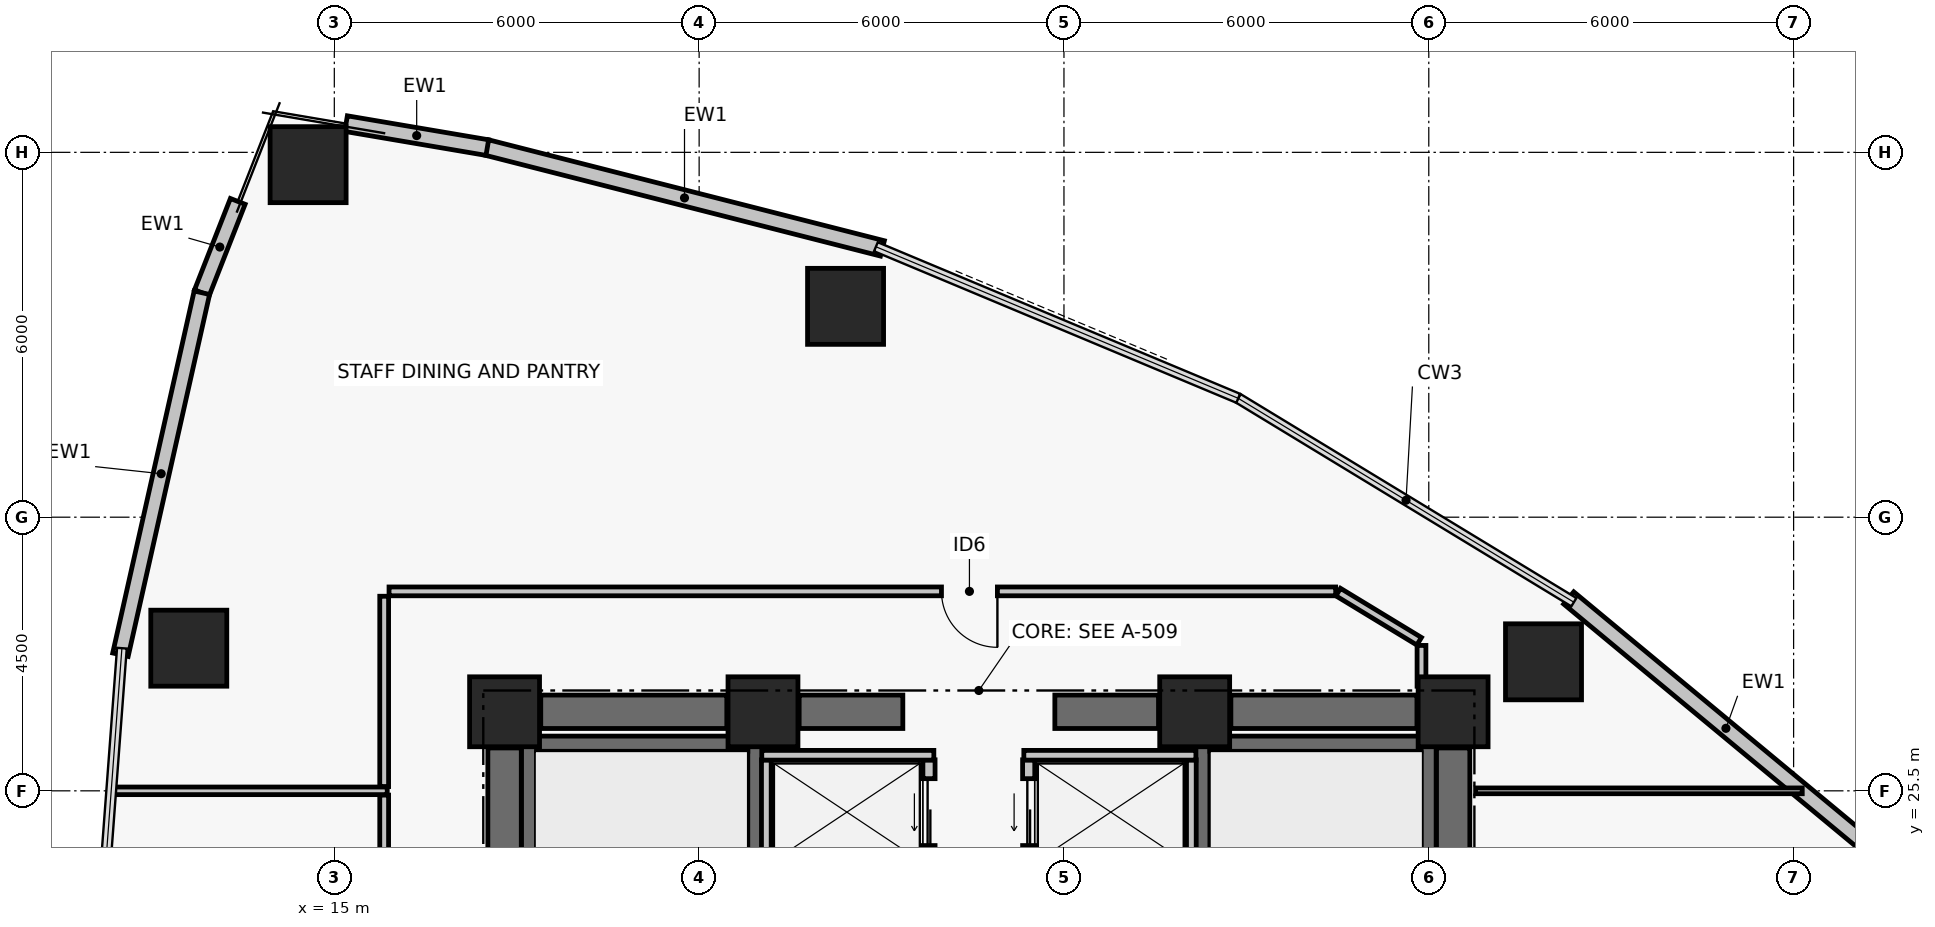
"""IFC4 building model, lengths in metres.
Left out: names, types, materials, properties, quantities, classifications, styles, units other than length and angle.
Written with IfcOpenShell. Run it as: python <this file> out.ifc"""

import sys

from ifc_helpers import new_model, si_unit, direction, frame, frame_2d, origin, origin_2d, place, context, subcontext, project, spatial, rectangle, hollow_rectangle, extrude, element, fill, save


model = new_model("IFC4")
c1 = context("Model", 3, precision=1e-05, world=origin(), true_north=direction((0.0, 1.0)))
c2 = subcontext(c1, "Body", "Model", "MODEL_VIEW")
j1 = project(units=[si_unit("LENGTHUNIT", "METRE"), si_unit("PLANEANGLEUNIT", "RADIAN")], contexts=[c1])
p1 = place(None, origin())
s1 = spatial("IfcSite", under=j1, at=p1, CompositionType="ELEMENT")
p2 = place(p1, origin())
s2 = spatial("IfcBuilding", under=s1, at=p2, CompositionType="ELEMENT")
p3 = place(p2, frame((0.0, 0.0, 89.1)))
s3 = spatial("IfcBuildingStorey", under=s2, at=p3, CompositionType="ELEMENT", Elevation=89.1)
for number, where, z_axis, x_axis in (
    (1, (17.8, 26.8, 0.0), (0.0, 0.0, 1.0), (1.0, 0.0, 0.0)),
    (2, (22.05, 26.8, 0.0), (0.0, 0.0, 1.0), (1.0, 0.0, 0.0)),
    (3, (29.15, 26.8, 0.0), (0.0, 0.0, 1.0), (1.0, 0.0, 0.0)),
    (4, (33.4, 26.8, 0.0), (0.0, 0.0, 1.0), (1.0, 0.0, 0.0)),
):
    element("IfcColumn", number, at=place(p3, frame(where, z_axis=z_axis, x_axis=x_axis)), inside=s3, PredefinedType="COLUMN", context=c2, shape_type="SweptSolid", body=[
        extrude(rectangle(XDim=1.15, YDim=1.15, at=origin_2d()), origin(), (0.0, 0.0, 1.0), 3.72),
    ])
p4 = place(p3, frame((18.395, 26.8, 0.0), z_axis=(0.0, 0.0, 1.0), x_axis=(1.0, 0.0, 0.0)))
e5 = element("IfcWall", 5, at=p4, inside=s3, PredefinedType="SHEAR", context=c2, shape_type="SweptSolid", body=[
    extrude(rectangle(XDim=3.06, YDim=0.55, at=frame_2d((1.53, 0.0))), origin(), (0.0, 0.0, 1.0), 3.47),
])
p5 = place(p3, frame((22.645, 26.8, 0.0), z_axis=(0.0, 0.0, 1.0), x_axis=(1.0, 0.0, 0.0)))
e6 = element("IfcWall", 6, at=p5, inside=s3, PredefinedType="SHEAR", context=c2, shape_type="SweptSolid", body=[
    extrude(rectangle(XDim=1.705, YDim=0.55, at=frame_2d((0.853, 0.0))), origin(), (0.0, 0.0, 1.0), 3.47),
])
p6 = place(p3, frame((26.85, 26.8, 0.0), z_axis=(0.0, 0.0, 1.0), x_axis=(1.0, 0.0, 0.0)))
e7 = element("IfcWall", 7, at=p6, inside=s3, PredefinedType="SHEAR", context=c2, shape_type="SweptSolid", body=[
    extrude(rectangle(XDim=1.705, YDim=0.55, at=frame_2d((0.853, 0.0))), origin(), (0.0, 0.0, 1.0), 3.47),
])
p7 = place(p3, frame((29.745, 26.8, 0.0), z_axis=(0.0, 0.0, 1.0), x_axis=(1.0, 0.0, 0.0)))
e8 = element("IfcWall", 8, at=p7, inside=s3, PredefinedType="SHEAR", context=c2, shape_type="SweptSolid", body=[
    extrude(rectangle(XDim=3.06, YDim=0.55, at=frame_2d((1.53, 0.0))), origin(), (0.0, 0.0, 1.0), 3.47),
])
for number, where, z_axis, x_axis in (
    (9, (17.8, 17.795, 0.0), (0.0, 0.0, 1.0), (0.0, 1.0, 0.0)),
    (10, (33.4, 17.795, 0.0), (0.0, 0.0, 1.0), (0.0, 1.0, 0.0)),
):
    element("IfcWall", number, at=place(p3, frame(where, z_axis=z_axis, x_axis=x_axis)), inside=s3, PredefinedType="SHEAR", context=c2, shape_type="SweptSolid", body=[
        extrude(rectangle(XDim=8.41, YDim=0.55, at=frame_2d((4.205, 0.0))), origin(), (0.0, 0.0, 1.0), 3.47),
    ])
p8 = place(p3, frame((18.204, 17.6, 0.0), z_axis=(0.0, 0.0, 1.0), x_axis=(0.0, 1.0, 0.0)))
e11 = element("IfcWall", 11, at=p8, inside=s3, PredefinedType="SHEAR", context=c2, shape_type="SweptSolid", body=[
    extrude(rectangle(XDim=8.8, YDim=0.25, at=frame_2d((4.4, 0.0))), origin(), (0.0, 0.0, 1.0), 3.47),
])
p9 = place(p3, frame((21.925, 17.6, 0.0), z_axis=(0.0, 0.0, 1.0), x_axis=(0.0, 1.0, 0.0)))
e12 = element("IfcWall", 12, at=p9, inside=s3, PredefinedType="SHEAR", context=c2, shape_type="SweptSolid", body=[
    extrude(rectangle(XDim=8.8, YDim=0.25, at=frame_2d((4.4, 0.0))), origin(), (0.0, 0.0, 1.0), 3.47),
])
p10 = place(p9, frame((0.35, 0.0, 0.0)))
e13 = element("IfcOpeningElement", 13, at=p10, cuts=e12, PredefinedType="OPENING", context=c2, shape_type="SweptSolid", body=[
    extrude(rectangle(XDim=1.05, YDim=2.08, at=frame_2d((0.525, 1.04))), frame((0.0, 0.135, 0.0), z_axis=(0.0, -1.0, 0.0), x_axis=(1.0, 0.0, 0.0)), (0.0, 0.0, 1.0), 0.27),
])
p11 = place(p3, frame((18.329, 26.275, 0.0), z_axis=(0.0, 0.0, 1.0), x_axis=(1.0, 0.0, 0.0)))
e14 = element("IfcWall", 14, at=p11, inside=s3, PredefinedType="SHEAR", context=c2, shape_type="SweptSolid", body=[
    extrude(rectangle(XDim=3.471, YDim=0.25, at=frame_2d((1.735, 0.0))), origin(), (0.0, 0.0, 1.0), 3.47),
])
p12 = place(p3, frame((29.275, 17.6, 0.0), z_axis=(0.0, 0.0, 1.0), x_axis=(0.0, 1.0, 0.0)))
e15 = element("IfcWall", 15, at=p12, inside=s3, PredefinedType="SHEAR", context=c2, shape_type="SweptSolid", body=[
    extrude(rectangle(XDim=8.8, YDim=0.25, at=frame_2d((4.4, 0.0))), origin(), (0.0, 0.0, 1.0), 3.47),
])
p13 = place(p12, frame((0.35, 0.0, 0.0)))
e16 = element("IfcOpeningElement", 16, at=p13, cuts=e15, PredefinedType="OPENING", context=c2, shape_type="SweptSolid", body=[
    extrude(rectangle(XDim=1.05, YDim=2.08, at=frame_2d((0.525, 1.04))), frame((0.0, 0.135, 0.0), z_axis=(0.0, -1.0, 0.0), x_axis=(1.0, 0.0, 0.0)), (0.0, 0.0, 1.0), 0.27),
])
p14 = place(p3, frame((32.996, 17.6, 0.0), z_axis=(0.0, 0.0, 1.0), x_axis=(0.0, 1.0, 0.0)))
e17 = element("IfcWall", 17, at=p14, inside=s3, PredefinedType="SHEAR", context=c2, shape_type="SweptSolid", body=[
    extrude(rectangle(XDim=8.8, YDim=0.25, at=frame_2d((4.4, 0.0))), origin(), (0.0, 0.0, 1.0), 3.47),
])
p15 = place(p3, frame((29.4, 26.275, 0.0), z_axis=(0.0, 0.0, 1.0), x_axis=(1.0, 0.0, 0.0)))
e18 = element("IfcWall", 18, at=p15, inside=s3, PredefinedType="SHEAR", context=c2, shape_type="SweptSolid", body=[
    extrude(rectangle(XDim=3.471, YDim=0.25, at=frame_2d((1.736, 0.0))), origin(), (0.0, 0.0, 1.0), 3.47),
])
for number, where, z_axis, x_axis in (
    (19, (34.887, 27.622, 0.0), (0.0, 0.0, 1.0), (1.0, 0.0, 0.0)),
    (20, (23.408, 33.467, 0.0), (0.0, 0.0, 1.0), (1.0, 0.0, 0.0)),
    (21, (14.569, 35.797, 0.0), (0.0, 0.0, 1.0), (1.0, 0.0, 0.0)),
    (22, (12.607, 27.846, 0.0), (0.0, 0.0, 1.0), (1.0, 0.0, 0.0)),
):
    element("IfcColumn", number, at=place(p3, frame(where, z_axis=z_axis, x_axis=x_axis)), inside=s3, PredefinedType="COLUMN", context=c2, shape_type="SweptSolid", body=[
        extrude(hollow_rectangle(XDim=1.25, YDim=1.25, WallThickness=0.05, at=origin_2d()), origin(), (0.0, 0.0, 1.0), 3.72),
    ])
p16 = place(p3, frame((35.301, 28.672, 0.0), z_axis=(0.0, 0.0, 1.0), x_axis=(0.76975316947, -0.638341646841, 0.0)))
e23 = element("IfcWall", 23, at=p16, inside=s3, PredefinedType="PARTITIONING", context=c2, shape_type="SweptSolid", body=[
    extrude(rectangle(XDim=6.718, YDim=0.26, at=frame_2d((3.359, 0.0))), origin(), (0.0, 0.0, 1.0), 3.47),
])
p17 = place(p3, frame((17.505, 36.081, 0.0), z_axis=(0.0, 0.0, 1.0), x_axis=(0.968981437296, -0.247133514876, 0.0)))
e24 = element("IfcWall", 24, at=p17, inside=s3, PredefinedType="PARTITIONING", context=c2, shape_type="SweptSolid", body=[
    extrude(rectangle(XDim=6.718, YDim=0.26, at=frame_2d((3.359, 0.0))), origin(), (0.0, 0.0, 1.0), 3.47),
])
p18 = place(p3, frame((15.193, 36.472, 0.0), z_axis=(0.0, 0.0, 1.0), x_axis=(0.985905269947, -0.167304508875, 0.0)))
e25 = element("IfcWall", 25, at=p18, inside=s3, PredefinedType="PARTITIONING", context=c2, shape_type="SweptSolid", body=[
    extrude(rectangle(XDim=2.357, YDim=0.26, at=frame_2d((1.178, 0.0))), origin(), (0.0, 0.0, 1.0), 3.47),
])
p19 = place(p3, frame((12.822, 33.691, 0.0), z_axis=(0.0, 0.0, 1.0), x_axis=(0.365488551504, 0.930815835018, 0.0)))
e26 = element("IfcWall", 26, at=p19, inside=s3, PredefinedType="PARTITIONING", context=c2, shape_type="SweptSolid", body=[
    extrude(rectangle(XDim=1.614, YDim=0.26, at=frame_2d((0.807, 0.0))), origin(), (0.0, 0.0, 1.0), 3.47),
])
p20 = place(p3, frame((11.482, 27.738, 0.0), z_axis=(0.0, 0.0, 1.0), x_axis=(0.219535044336, 0.975604614743, 0.0)))
e27 = element("IfcWall", 27, at=p20, inside=s3, PredefinedType="PARTITIONING", context=c2, shape_type="SweptSolid", body=[
    extrude(rectangle(XDim=6.102, YDim=0.26, at=frame_2d((3.051, 0.0))), origin(), (0.0, 0.0, 1.0), 3.47),
])
p21 = place(p3, frame((24.78, 24.29, 0.0), z_axis=(0.0, 0.0, 1.0), x_axis=(0.0, 1.0, 0.0)))
e28 = element("IfcWall", 28, at=p21, inside=s3, PredefinedType="PARTITIONING", context=c2, shape_type="SweptSolid", body=[
    extrude(rectangle(XDim=1.72, YDim=0.2, at=frame_2d((0.86, 0.0))), origin(), (0.0, 0.0, 1.0), 3.47),
])
p22 = place(p21, frame((0.31, 0.0, 0.0)))
e29 = element("IfcOpeningElement", 29, at=p22, cuts=e28, PredefinedType="OPENING", context=c2, shape_type="SweptSolid", body=[
    extrude(rectangle(XDim=1.1, YDim=2.08, at=frame_2d((0.55, 1.04))), frame((0.0, 0.11, 0.0), z_axis=(0.0, -1.0, 0.0), x_axis=(1.0, 0.0, 0.0)), (0.0, 0.0, 1.0), 0.22),
])
p23 = place(p3, frame((26.42, 24.29, 0.0), z_axis=(0.0, 0.0, 1.0), x_axis=(0.0, 1.0, 0.0)))
e30 = element("IfcWall", 30, at=p23, inside=s3, PredefinedType="PARTITIONING", context=c2, shape_type="SweptSolid", body=[
    extrude(rectangle(XDim=1.72, YDim=0.2, at=frame_2d((0.86, 0.0))), origin(), (0.0, 0.0, 1.0), 3.47),
])
p24 = place(p23, frame((0.31, 0.0, 0.0)))
e31 = element("IfcOpeningElement", 31, at=p24, cuts=e30, PredefinedType="OPENING", context=c2, shape_type="SweptSolid", body=[
    extrude(rectangle(XDim=1.1, YDim=2.08, at=frame_2d((0.55, 1.04))), frame((0.0, 0.11, 0.0), z_axis=(0.0, -1.0, 0.0), x_axis=(1.0, 0.0, 0.0)), (0.0, 0.0, 1.0), 0.22),
])
p25 = place(p3, frame((22.105, 20.56, 0.0), z_axis=(0.0, 0.0, 1.0), x_axis=(0.0, 1.0, 0.0)))
e32 = element("IfcWall", 32, at=p25, inside=s3, PredefinedType="PARTITIONING", context=c2, shape_type="SweptSolid", body=[
    extrude(rectangle(XDim=5.45, YDim=0.16, at=frame_2d((2.725, 0.0))), origin(), (0.0, 0.0, 1.0), 3.47),
])
p26 = place(p3, frame((22.03, 26.085, 0.0), z_axis=(0.0, 0.0, 1.0), x_axis=(1.0, 0.0, 0.0)))
e33 = element("IfcWall", 33, at=p26, inside=s3, PredefinedType="PARTITIONING", context=c2, shape_type="SweptSolid", body=[
    extrude(rectangle(XDim=2.83, YDim=0.16, at=frame_2d((1.415, 0.0))), origin(), (0.0, 0.0, 1.0), 3.47),
])
p27 = place(p3, frame((29.095, 20.56, 0.0), z_axis=(0.0, 0.0, 1.0), x_axis=(0.0, 1.0, 0.0)))
e34 = element("IfcWall", 34, at=p27, inside=s3, PredefinedType="PARTITIONING", context=c2, shape_type="SweptSolid", body=[
    extrude(rectangle(XDim=5.45, YDim=0.16, at=frame_2d((2.725, 0.0))), origin(), (0.0, 0.0, 1.0), 3.47),
])
p28 = place(p3, frame((26.34, 26.085, 0.0), z_axis=(0.0, 0.0, 1.0), x_axis=(1.0, 0.0, 0.0)))
e35 = element("IfcWall", 35, at=p28, inside=s3, PredefinedType="PARTITIONING", context=c2, shape_type="SweptSolid", body=[
    extrude(rectangle(XDim=2.83, YDim=0.16, at=frame_2d((1.415, 0.0))), origin(), (0.0, 0.0, 1.0), 3.47),
])
p29 = place(p3, frame((33.74, 27.22, 0.0), z_axis=(0.0, 0.0, 1.0), x_axis=(-1.0, 0.0, 0.0)))
e36 = element("IfcWall", 36, at=p29, inside=s3, PredefinedType="PARTITIONING", context=c2, shape_type="SweptSolid", body=[
    extrude(rectangle(XDim=0.86, YDim=0.145, at=frame_2d((0.43, 0.0))), origin(), (0.0, 0.0, 1.0), 2.6),
])
p30 = place(p3, frame((32.88, 27.22, 0.0), z_axis=(0.0, 0.0, 1.0), x_axis=(0.0, 1.0, 0.0)))
e37 = element("IfcWall", 37, at=p30, inside=s3, PredefinedType="PARTITIONING", context=c2, shape_type="SweptSolid", body=[
    extrude(rectangle(XDim=0.671, YDim=0.145, at=frame_2d((0.335, 0.0))), origin(), (0.0, 0.0, 1.0), 2.6),
])
p31 = place(p3, frame((32.842, 27.96, 0.0), z_axis=(0.0, 0.0, 1.0), x_axis=(-0.854742818792, 0.519051744745, 0.0)))
e38 = element("IfcWall", 38, at=p31, inside=s3, PredefinedType="PARTITIONING", context=c2, shape_type="SweptSolid", body=[
    extrude(rectangle(XDim=1.558, YDim=0.145, at=frame_2d((0.779, 0.0))), origin(), (0.0, 0.0, 1.0), 3.05),
])
p32 = place(p3, frame((31.469, 28.78, 0.0), z_axis=(0.0, 0.0, 1.0), x_axis=(-1.0, 0.0, 0.0)))
e39 = element("IfcWall", 39, at=p32, inside=s3, PredefinedType="PARTITIONING", context=c2, shape_type="SweptSolid", body=[
    extrude(rectangle(XDim=15.569, YDim=0.145, at=frame_2d((7.784, 0.0))), origin(), (0.0, 0.0, 1.0), 2.65),
])
p33 = place(p32, frame((5.563, 0.0, 0.0)))
e40 = element("IfcOpeningElement", 40, at=p33, cuts=e39, PredefinedType="OPENING", context=c2, shape_type="SweptSolid", body=[
    extrude(rectangle(XDim=0.92, YDim=2.05, at=frame_2d((0.46, 1.025))), frame((0.0, 0.083, 0.0), z_axis=(0.0, -1.0, 0.0), x_axis=(1.0, 0.0, 0.0)), (0.0, 0.0, 1.0), 0.165),
])
p34 = place(p3, frame((15.82, 28.7, 0.0), z_axis=(0.0, 0.0, 1.0), x_axis=(0.0, -1.0, 0.0)))
e41 = element("IfcWall", 41, at=p34, inside=s3, PredefinedType="PARTITIONING", context=c2, shape_type="SweptSolid", body=[
    extrude(rectangle(XDim=3.13, YDim=0.145, at=frame_2d((1.565, 0.0))), origin(), (0.0, 0.0, 1.0), 2.65),
])
p35 = place(p3, frame((15.82, 25.43, 0.0), z_axis=(0.0, 0.0, 1.0), x_axis=(0.0, -1.0, 0.0)))
e42 = element("IfcWall", 42, at=p35, inside=s3, PredefinedType="PARTITIONING", context=c2, shape_type="SweptSolid", body=[
    extrude(rectangle(XDim=6.86, YDim=0.145, at=frame_2d((3.43, 0.0))), origin(), (0.0, 0.0, 1.0), 3.05),
])
p36 = place(p35, frame((2.955, 0.0, 0.0)))
e43 = element("IfcOpeningElement", 43, at=p36, cuts=e42, PredefinedType="OPENING", context=c2, shape_type="SweptSolid", body=[
    extrude(rectangle(XDim=0.95, YDim=2.06, at=frame_2d((0.475, 1.03))), frame((0.0, 0.083, 0.0), z_axis=(0.0, -1.0, 0.0), x_axis=(1.0, 0.0, 0.0)), (0.0, 0.0, 1.0), 0.165),
])
p37 = place(p3, frame((11.321, 25.5, 0.0), z_axis=(0.0, 0.0, 1.0), x_axis=(1.0, 0.0, 0.0)))
e44 = element("IfcWall", 44, at=p37, inside=s3, PredefinedType="PARTITIONING", context=c2, shape_type="SweptSolid", body=[
    extrude(rectangle(XDim=4.549, YDim=0.125, at=frame_2d((2.275, 0.0))), origin(), (0.0, 0.0, 1.0), 2.85),
])
p38 = place(p3, frame((33.77, 25.5, 0.0), z_axis=(0.0, 0.0, 1.0), x_axis=(1.0, 0.0, 0.0)))
e45 = element("IfcWall", 45, at=p38, inside=s3, PredefinedType="PARTITIONING", context=c2, shape_type="SweptSolid", body=[
    extrude(rectangle(XDim=5.372, YDim=0.095, at=frame_2d((2.686, 0.0))), origin(), (0.0, 0.0, 1.0), 2.6),
])
p39 = place(p22, origin())
e46 = element("IfcDoor", 46, at=p39, inside=s3, OperationType="DOUBLE_DOOR_SLIDING", PredefinedType="DOOR", context=c2, shape_type="SweptSolid", body=[
    extrude(rectangle(XDim=1.1, YDim=2.08, at=frame_2d((0.55, 1.04))), frame((0.0, 0.025, 0.0), z_axis=(0.0, -1.0, 0.0), x_axis=(1.0, 0.0, 0.0)), (0.0, 0.0, 1.0), 0.05),
])
fill(e29, e46)
p40 = place(p24, origin())
e47 = element("IfcDoor", 47, at=p40, inside=s3, OperationType="DOUBLE_DOOR_SLIDING", PredefinedType="DOOR", context=c2, shape_type="SweptSolid", body=[
    extrude(rectangle(XDim=1.1, YDim=2.08, at=frame_2d((0.55, 1.04))), frame((0.0, 0.025, 0.0), z_axis=(0.0, -1.0, 0.0), x_axis=(1.0, 0.0, 0.0)), (0.0, 0.0, 1.0), 0.05),
])
fill(e31, e47)
p41 = place(p33, origin())
e48 = element("IfcDoor", 48, at=p41, inside=s3, OperationType="SINGLE_SWING_LEFT", PredefinedType="DOOR", context=c2, shape_type="SweptSolid", body=[
    extrude(rectangle(XDim=0.92, YDim=2.05, at=frame_2d((0.46, 1.025))), frame((0.0, 0.025, 0.0), z_axis=(0.0, -1.0, 0.0), x_axis=(1.0, 0.0, 0.0)), (0.0, 0.0, 1.0), 0.05),
])
fill(e40, e48)
save(model, sys.argv[1])
